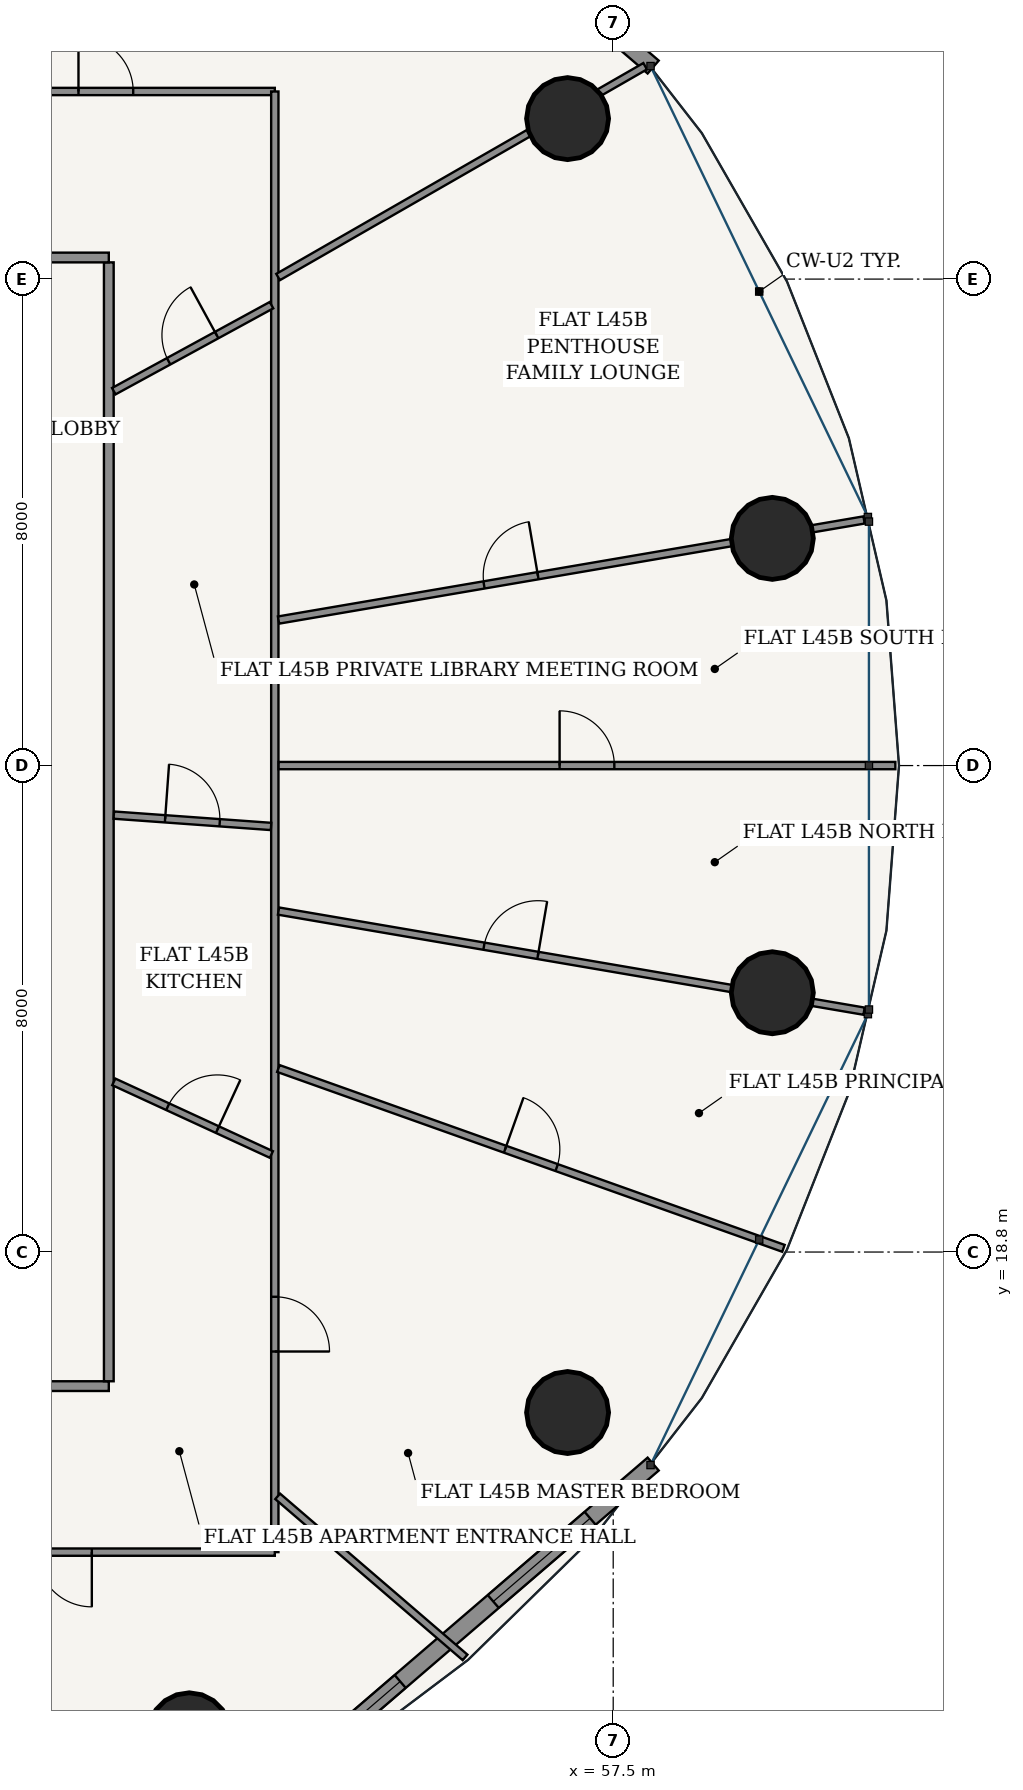
"""IFC4 building model, lengths in metres.
Left out: names, types, materials, properties, quantities, classifications, styles, units other than length and angle.
Written with IfcOpenShell. Run it as: python <this file> out.ifc"""

import sys

from ifc_helpers import new_model, si_unit, direction, frame, frame_2d, origin, origin_2d, place, context, subcontext, project, spatial, rectangle, hollow_circle, extrude, source, transform, mapped, element, fill, save


model = new_model("IFC4")
c1 = context("Model", 3, precision=1e-05, world=origin(), true_north=direction((-0.2419218956, 0.970295726276)))
c2 = subcontext(c1, "Body", "Model", "MODEL_VIEW")
j1 = project(units=[si_unit("LENGTHUNIT", "METRE"), si_unit("PLANEANGLEUNIT", "RADIAN")], contexts=[c1])
p1 = place(None, origin())
s1 = spatial("IfcSite", under=j1, at=p1, CompositionType="ELEMENT")
p2 = place(p1, origin())
s2 = spatial("IfcBuilding", under=s1, at=p2, CompositionType="ELEMENT")
p3 = place(p2, frame((0.0, 0.0, 171.4)))
s3 = spatial("IfcBuildingStorey", under=s2, at=p3, CompositionType="ELEMENT", Elevation=171.4)
for number, where, z_axis, x_axis in (
    (1, (60.117, 30.536, 0.0), (0.0, 0.0, 1.0), (1.0, 0.0, 0.0)),
    (2, (56.75, 37.439, 0.0), (0.0, 0.0, 1.0), (1.0, 0.0, 0.0)),
    (3, (50.528, 10.877, 0.0), (0.0, 0.0, 1.0), (1.0, 0.0, 0.0)),
    (4, (56.75, 16.161, 0.0), (0.0, 0.0, 1.0), (1.0, 0.0, 0.0)),
    (5, (60.117, 23.064, 0.0), (0.0, 0.0, 1.0), (1.0, 0.0, 0.0)),
):
    element("IfcColumn", number, at=place(p3, frame(where, z_axis=z_axis, x_axis=x_axis)), inside=s3, PredefinedType="COLUMN", context=c2, shape_type="SweptSolid", body=[
        extrude(hollow_circle(Radius=0.675, WallThickness=0.042, at=origin_2d()), origin(), (0.0, 0.0, 1.0), 3.6),
    ])
p4 = place(p3, frame((58.157, 38.287, 0.0), z_axis=(0.0, 0.0, 1.0), x_axis=(-0.75843401647, 0.651749831348, 0.0)))
e6 = element("IfcWall", 6, at=p4, inside=s3, PredefinedType="SOLIDWALL", context=c2, shape_type="SweptSolid", body=[
    extrude(rectangle(XDim=8.952, YDim=0.28, at=frame_2d((4.476, 0.0))), origin(), (0.0, 0.0, 1.0), 3.33),
])
p5 = place(p4, frame((1.367, 0.0, 0.85)))
e7 = element("IfcOpeningElement", 7, at=p5, cuts=e6, PredefinedType="OPENING", context=c2, shape_type="SweptSolid", body=[
    extrude(rectangle(XDim=2.1, YDim=1.95, at=frame_2d((1.05, 0.975))), frame((0.0, 0.15, 0.0), z_axis=(0.0, -1.0, 0.0), x_axis=(1.0, 0.0, 0.0)), (0.0, 0.0, 1.0), 0.3),
])
p6 = place(p4, frame((5.485, 0.0, 0.85)))
e8 = element("IfcOpeningElement", 8, at=p6, cuts=e6, PredefinedType="OPENING", context=c2, shape_type="SweptSolid", body=[
    extrude(rectangle(XDim=2.1, YDim=1.95, at=frame_2d((1.05, 0.975))), frame((0.0, 0.15, 0.0), z_axis=(0.0, -1.0, 0.0), x_axis=(1.0, 0.0, 0.0)), (0.0, 0.0, 1.0), 0.3),
])
p7 = place(p3, frame((51.367, 9.478, 0.0), z_axis=(0.0, 0.0, 1.0), x_axis=(0.75843401647, 0.651749831348, 0.0)))
e9 = element("IfcWall", 9, at=p7, inside=s3, PredefinedType="SOLIDWALL", context=c2, shape_type="SweptSolid", body=[
    extrude(rectangle(XDim=8.952, YDim=0.28, at=frame_2d((4.476, 0.0))), origin(), (0.0, 0.0, 1.0), 3.33),
])
p8 = place(p7, frame((1.367, 0.0, 0.85)))
e10 = element("IfcOpeningElement", 10, at=p8, cuts=e9, PredefinedType="OPENING", context=c2, shape_type="SweptSolid", body=[
    extrude(rectangle(XDim=2.1, YDim=1.95, at=frame_2d((1.05, 0.975))), frame((0.0, 0.15, 0.0), z_axis=(0.0, -1.0, 0.0), x_axis=(1.0, 0.0, 0.0)), (0.0, 0.0, 1.0), 0.3),
])
p9 = place(p7, frame((5.485, 0.0, 0.85)))
e11 = element("IfcOpeningElement", 11, at=p9, cuts=e9, PredefinedType="OPENING", context=c2, shape_type="SweptSolid", body=[
    extrude(rectangle(XDim=2.1, YDim=1.95, at=frame_2d((1.05, 0.975))), frame((0.0, 0.15, 0.0), z_axis=(0.0, -1.0, 0.0), x_axis=(1.0, 0.0, 0.0)), (0.0, 0.0, 1.0), 0.3),
])
p10 = place(p3, frame((34.32, 16.595, 0.0), z_axis=(0.0, 0.0, 1.0), x_axis=(1.0, 0.0, 0.0)))
e12 = element("IfcWall", 12, at=p10, inside=s3, PredefinedType="PARTITIONING", context=c2, shape_type="SweptSolid", body=[
    extrude(rectangle(XDim=14.885, YDim=0.16, at=frame_2d((7.442, 0.0))), origin(), (0.0, 0.0, 1.0), 2.776),
])
p11 = place(p10, frame((11.59, 0.0, 0.0)))
e13 = element("IfcOpeningElement", 13, at=p11, cuts=e12, PredefinedType="OPENING", context=c2, shape_type="SweptSolid", body=[
    extrude(rectangle(XDim=0.98, YDim=2.2, at=frame_2d((0.49, 1.1))), frame((0.0, 0.09, 0.0), z_axis=(0.0, -1.0, 0.0), x_axis=(1.0, 0.0, 0.0)), (0.0, 0.0, 1.0), 0.18),
])
p12 = place(p3, frame((49.205, 16.675, 0.0), z_axis=(0.0, 0.0, 1.0), x_axis=(0.0, 1.0, 0.0)))
e14 = element("IfcWall", 14, at=p12, inside=s3, PredefinedType="PARTITIONING", context=c2, shape_type="SweptSolid", body=[
    extrude(rectangle(XDim=18.4, YDim=0.16, at=frame_2d((9.2, 0.0))), origin(), (0.0, 0.0, 1.0), 2.776),
])
p13 = place(p3, frame((47.275, 35.155, 0.0), z_axis=(0.0, 0.0, 1.0), x_axis=(1.0, 0.0, 0.0)))
e15 = element("IfcWall", 15, at=p13, inside=s3, PredefinedType="PARTITIONING", context=c2, shape_type="SweptSolid", body=[
    extrude(rectangle(XDim=1.93, YDim=0.16, at=frame_2d((0.965, 0.0))), origin(), (0.0, 0.0, 1.0), 2.776),
])
p14 = place(p3, frame((44.465, 37.885, 0.0), z_axis=(0.0, 0.0, 1.0), x_axis=(1.0, 0.0, 0.0)))
e16 = element("IfcWall", 16, at=p14, inside=s3, PredefinedType="PARTITIONING", context=c2, shape_type="SweptSolid", body=[
    extrude(rectangle(XDim=7.47, YDim=0.12, at=frame_2d((3.735, 0.0))), origin(), (0.0, 0.0, 1.0), 2.776),
])
p15 = place(p14, frame((4.241, 0.0, 0.0)))
e17 = element("IfcOpeningElement", 17, at=p15, cuts=e16, PredefinedType="OPENING", context=c2, shape_type="SweptSolid", body=[
    extrude(rectangle(XDim=0.9, YDim=2.15, at=frame_2d((0.45, 1.075))), frame((0.0, 0.07, 0.0), z_axis=(0.0, -1.0, 0.0), x_axis=(1.0, 0.0, 0.0)), (0.0, 0.0, 1.0), 0.14),
])
p16 = place(p3, frame((51.935, 37.885, 0.0), z_axis=(0.0, 0.0, 1.0), x_axis=(0.0, -1.0, 0.0)))
e18 = element("IfcWall", 18, at=p16, inside=s3, PredefinedType="PARTITIONING", context=c2, shape_type="SweptSolid", body=[
    extrude(rectangle(XDim=24.02, YDim=0.12, at=frame_2d((12.01, 0.0))), origin(), (0.0, 0.0, 1.0), 2.776),
])
p17 = place(p16, frame((19.821, 0.0, 0.0)))
e19 = element("IfcOpeningElement", 19, at=p17, cuts=e18, PredefinedType="OPENING", context=c2, shape_type="SweptSolid", body=[
    extrude(rectangle(XDim=0.9, YDim=2.15, at=frame_2d((0.45, 1.075))), frame((0.0, 0.07, 0.0), z_axis=(0.0, -1.0, 0.0), x_axis=(1.0, 0.0, 0.0)), (0.0, 0.0, 1.0), 0.14),
])
p18 = place(p3, frame((51.935, 13.865, 0.0), z_axis=(0.0, 0.0, 1.0), x_axis=(-1.0, 0.0, 0.0)))
e20 = element("IfcWall", 20, at=p18, inside=s3, PredefinedType="PARTITIONING", context=c2, shape_type="SweptSolid", body=[
    extrude(rectangle(XDim=13.833, YDim=0.12, at=frame_2d((6.917, 0.0))), origin(), (0.0, 0.0, 1.0), 2.776),
])
p19 = place(p18, frame((3.009, 0.0, 0.0)))
e21 = element("IfcOpeningElement", 21, at=p19, cuts=e20, PredefinedType="OPENING", context=c2, shape_type="SweptSolid", body=[
    extrude(rectangle(XDim=0.9, YDim=2.15, at=frame_2d((0.45, 1.075))), frame((0.0, 0.07, 0.0), z_axis=(0.0, -1.0, 0.0), x_axis=(1.0, 0.0, 0.0)), (0.0, 0.0, 1.0), 0.14),
])
p20 = place(p3, frame((51.982, 14.782, 0.0), z_axis=(0.0, 0.0, 1.0), x_axis=(0.758356837469, -0.651839632935, 0.0)))
e22 = element("IfcWall", 22, at=p20, inside=s3, PredefinedType="PARTITIONING", context=c2, shape_type="SweptSolid", body=[
    extrude(rectangle(XDim=4.064, YDim=0.12, at=frame_2d((2.032, 0.0))), origin(), (0.0, 0.0, 1.0), 2.846),
])
p21 = place(p3, frame((51.993, 21.818, 0.0), z_axis=(0.0, 0.0, 1.0), x_axis=(0.942077868165, -0.335394231187, 0.0)))
e23 = element("IfcWall", 23, at=p21, inside=s3, PredefinedType="PARTITIONING", context=c2, shape_type="SweptSolid", body=[
    extrude(rectangle(XDim=8.817, YDim=0.12, at=frame_2d((4.408, 0.0))), origin(), (0.0, 0.0, 1.0), 2.846),
])
p22 = place(p21, frame((3.958, 0.0, 0.0)))
e24 = element("IfcOpeningElement", 24, at=p22, cuts=e23, PredefinedType="OPENING", context=c2, shape_type="SweptSolid", body=[
    extrude(rectangle(XDim=0.9, YDim=2.15, at=frame_2d((0.45, 1.075))), frame((0.0, 0.07, 0.0), z_axis=(0.0, -1.0, 0.0), x_axis=(1.0, 0.0, 0.0)), (0.0, 0.0, 1.0), 0.14),
])
p23 = place(p3, frame((51.996, 24.407, 0.0), z_axis=(0.0, 0.0, 1.0), x_axis=(0.985698378271, -0.168519159369, 0.0)))
e25 = element("IfcWall", 25, at=p23, inside=s3, PredefinedType="PARTITIONING", context=c2, shape_type="SweptSolid", body=[
    extrude(rectangle(XDim=9.769, YDim=0.12, at=frame_2d((4.884, 0.0))), origin(), (0.0, 0.0, 1.0), 2.776),
])
p24 = place(p23, frame((3.428, 0.0, 0.0)))
e26 = element("IfcOpeningElement", 26, at=p24, cuts=e25, PredefinedType="OPENING", context=c2, shape_type="SweptSolid", body=[
    extrude(rectangle(XDim=0.9, YDim=2.15, at=frame_2d((0.45, 1.075))), frame((0.0, 0.07, 0.0), z_axis=(0.0, -1.0, 0.0), x_axis=(1.0, 0.0, 0.0)), (0.0, 0.0, 1.0), 0.14),
])
p25 = place(p3, frame((51.997, 26.8, 0.0), z_axis=(0.0, 0.0, 1.0), x_axis=(1.0, 0.0, 0.0)))
e27 = element("IfcWall", 27, at=p25, inside=s3, PredefinedType="PARTITIONING", context=c2, shape_type="SweptSolid", body=[
    extrude(rectangle(XDim=10.143, YDim=0.12, at=frame_2d((5.071, 0.0))), origin(), (0.0, 0.0, 1.0), 2.846),
])
p26 = place(p25, frame((4.622, 0.0, 0.0)))
e28 = element("IfcOpeningElement", 28, at=p26, cuts=e27, PredefinedType="OPENING", context=c2, shape_type="SweptSolid", body=[
    extrude(rectangle(XDim=0.9, YDim=2.15, at=frame_2d((0.45, 1.075))), frame((0.0, 0.07, 0.0), z_axis=(0.0, -1.0, 0.0), x_axis=(1.0, 0.0, 0.0)), (0.0, 0.0, 1.0), 0.14),
])
p27 = place(p3, frame((51.996, 29.193, 0.0), z_axis=(0.0, 0.0, 1.0), x_axis=(0.985698378271, 0.168519159369, 0.0)))
e29 = element("IfcWall", 29, at=p27, inside=s3, PredefinedType="PARTITIONING", context=c2, shape_type="SweptSolid", body=[
    extrude(rectangle(XDim=9.769, YDim=0.12, at=frame_2d((4.884, 0.0))), origin(), (0.0, 0.0, 1.0), 2.776),
])
p28 = place(p27, frame((3.428, 0.0, 0.0)))
e30 = element("IfcOpeningElement", 30, at=p28, cuts=e29, PredefinedType="OPENING", context=c2, shape_type="SweptSolid", body=[
    extrude(rectangle(XDim=0.9, YDim=2.15, at=frame_2d((0.45, 1.075))), frame((0.0, 0.07, 0.0), z_axis=(0.0, -1.0, 0.0), x_axis=(1.0, 0.0, 0.0)), (0.0, 0.0, 1.0), 0.14),
])
p29 = place(p3, frame((51.989, 34.834, 0.0), z_axis=(0.0, 0.0, 1.0), x_axis=(0.86717064002, 0.498011125466, 0.0)))
e31 = element("IfcWall", 31, at=p29, inside=s3, PredefinedType="PARTITIONING", context=c2, shape_type="SweptSolid", body=[
    extrude(rectangle(XDim=6.961, YDim=0.12, at=frame_2d((3.48, 0.0))), origin(), (0.0, 0.0, 1.0), 2.776),
])
p30 = place(p3, frame((46.656, 37.934, 0.0), z_axis=(0.0, 0.0, 1.0), x_axis=(0.613758289074, 0.789493991487, 0.0)))
e32 = element("IfcWall", 32, at=p30, inside=s3, PredefinedType="PARTITIONING", context=c2, shape_type="SweptSolid", body=[
    extrude(rectangle(XDim=7.695, YDim=0.12, at=frame_2d((3.848, 0.0))), origin(), (0.0, 0.0, 1.0), 2.776),
])
p31 = place(p30, frame((2.399, 0.0, 0.0)))
e33 = element("IfcOpeningElement", 33, at=p31, cuts=e32, PredefinedType="OPENING", context=c2, shape_type="SweptSolid", body=[
    extrude(rectangle(XDim=0.9, YDim=2.15, at=frame_2d((0.45, 1.075))), frame((0.0, 0.07, 0.0), z_axis=(0.0, -1.0, 0.0), x_axis=(1.0, 0.0, 0.0)), (0.0, 0.0, 1.0), 0.14),
])
p32 = place(p3, frame((49.287, 21.598, 0.0), z_axis=(0.0, 0.0, 1.0), x_axis=(0.908177096136, -0.418586146514, 0.0)))
e34 = element("IfcWall", 34, at=p32, inside=s3, PredefinedType="PARTITIONING", context=c2, shape_type="SweptSolid", body=[
    extrude(rectangle(XDim=2.854, YDim=0.12, at=frame_2d((1.427, 0.0))), origin(), (0.0, 0.0, 1.0), 3.33),
])
p33 = place(p32, frame((0.977, 0.0, 0.0)))
e35 = element("IfcOpeningElement", 35, at=p33, cuts=e34, PredefinedType="OPENING", context=c2, shape_type="SweptSolid", body=[
    extrude(rectangle(XDim=0.9, YDim=2.15, at=frame_2d((0.45, 1.075))), frame((0.0, 0.07, 0.0), z_axis=(0.0, -1.0, 0.0), x_axis=(1.0, 0.0, 0.0)), (0.0, 0.0, 1.0), 0.14),
])
p34 = place(p3, frame((49.287, 25.985, 0.0), z_axis=(0.0, 0.0, 1.0), x_axis=(0.997408744903, -0.07194300237, 0.0)))
e36 = element("IfcWall", 36, at=p34, inside=s3, PredefinedType="PARTITIONING", context=c2, shape_type="SweptSolid", body=[
    extrude(rectangle(XDim=2.593, YDim=0.12, at=frame_2d((1.296, 0.0))), origin(), (0.0, 0.0, 1.0), 3.33),
])
p35 = place(p34, frame((0.846, 0.0, 0.0)))
e37 = element("IfcOpeningElement", 37, at=p35, cuts=e36, PredefinedType="OPENING", context=c2, shape_type="SweptSolid", body=[
    extrude(rectangle(XDim=0.9, YDim=2.15, at=frame_2d((0.45, 1.075))), frame((0.0, 0.07, 0.0), z_axis=(0.0, -1.0, 0.0), x_axis=(1.0, 0.0, 0.0)), (0.0, 0.0, 1.0), 0.14),
])
p36 = place(p3, frame((49.287, 32.957, 0.0), z_axis=(0.0, 0.0, 1.0), x_axis=(0.877892414948, 0.47885792024, 0.0)))
e38 = element("IfcWall", 38, at=p36, inside=s3, PredefinedType="PARTITIONING", context=c2, shape_type="SweptSolid", body=[
    extrude(rectangle(XDim=2.955, YDim=0.12, at=frame_2d((1.477, 0.0))), origin(), (0.0, 0.0, 1.0), 3.33),
])
p37 = place(p36, frame((1.027, 0.0, 0.0)))
e39 = element("IfcOpeningElement", 39, at=p37, cuts=e38, PredefinedType="OPENING", context=c2, shape_type="SweptSolid", body=[
    extrude(rectangle(XDim=0.9, YDim=2.15, at=frame_2d((0.45, 1.075))), frame((0.0, 0.07, 0.0), z_axis=(0.0, -1.0, 0.0), x_axis=(1.0, 0.0, 0.0)), (0.0, 0.0, 1.0), 0.14),
])
m1 = source(origin(), c2, "Body", "SweptSolid", [
    extrude(rectangle(XDim=2.1, YDim=1.95, at=frame_2d((1.05, 0.975))), frame((0.0, 0.03, 0.0), z_axis=(0.0, -1.0, 0.0), x_axis=(1.0, 0.0, 0.0)), (0.0, 0.0, 1.0), 0.06),
])
p38 = place(p8, origin())
e40 = element("IfcWindow", 40, at=p38, inside=s3, PartitioningType="SINGLE_PANEL", PredefinedType="WINDOW", context=c2, shape_type="MappedRepresentation", body=[
    mapped(m1, transform((0.0, 0.0, 0.0), scale=1.0)),
])
fill(e10, e40)
p39 = place(p9, origin())
e41 = element("IfcWindow", 41, at=p39, inside=s3, PartitioningType="SINGLE_PANEL", PredefinedType="WINDOW", context=c2, shape_type="MappedRepresentation", body=[
    mapped(m1, transform((0.0, 0.0, 0.0), scale=1.0)),
])
fill(e11, e41)
m2 = source(origin(), c2, "Body", "SweptSolid", [
    extrude(rectangle(XDim=0.9, YDim=2.15, at=frame_2d((0.45, 1.075))), frame((0.0, 0.025, 0.0), z_axis=(0.0, -1.0, 0.0), x_axis=(1.0, 0.0, 0.0)), (0.0, 0.0, 1.0), 0.05),
])
p40 = place(p19, origin())
e42 = element("IfcDoor", 42, at=p40, inside=s3, OperationType="SINGLE_SWING_LEFT", PredefinedType="DOOR", context=c2, shape_type="MappedRepresentation", body=[
    mapped(m2, transform((0.0, 0.0, 0.0), scale=1.0)),
])
fill(e21, e42)
p41 = place(p33, origin())
e43 = element("IfcDoor", 43, at=p41, inside=s3, OperationType="SINGLE_SWING_RIGHT", PredefinedType="DOOR", context=c2, shape_type="MappedRepresentation", body=[
    mapped(m2, transform((0.0, 0.0, 0.0), scale=1.0)),
])
fill(e35, e43)
p42 = place(p35, origin())
e44 = element("IfcDoor", 44, at=p42, inside=s3, OperationType="SINGLE_SWING_LEFT", PredefinedType="DOOR", context=c2, shape_type="MappedRepresentation", body=[
    mapped(m2, transform((0.0, 0.0, 0.0), scale=1.0)),
])
fill(e37, e44)
p43 = place(p37, origin())
e45 = element("IfcDoor", 45, at=p43, inside=s3, OperationType="SINGLE_SWING_RIGHT", PredefinedType="DOOR", context=c2, shape_type="MappedRepresentation", body=[
    mapped(m2, transform((0.0, 0.0, 0.0), scale=1.0)),
])
fill(e39, e45)
p44 = place(p17, origin())
e46 = element("IfcDoor", 46, at=p44, inside=s3, OperationType="SINGLE_SWING_RIGHT", PredefinedType="DOOR", context=c2, shape_type="MappedRepresentation", body=[
    mapped(m2, transform((0.0, 0.0, 0.0), scale=1.0)),
])
fill(e19, e46)
p45 = place(p22, origin())
e47 = element("IfcDoor", 47, at=p45, inside=s3, OperationType="SINGLE_SWING_LEFT", PredefinedType="DOOR", context=c2, shape_type="MappedRepresentation", body=[
    mapped(m2, transform((0.0, 0.0, 0.0), scale=1.0)),
])
fill(e24, e47)
p46 = place(p24, origin())
e48 = element("IfcDoor", 48, at=p46, inside=s3, OperationType="SINGLE_SWING_RIGHT", PredefinedType="DOOR", context=c2, shape_type="MappedRepresentation", body=[
    mapped(m2, transform((0.0, 0.0, 0.0), scale=1.0)),
])
fill(e26, e48)
p47 = place(p26, origin())
e49 = element("IfcDoor", 49, at=p47, inside=s3, OperationType="SINGLE_SWING_LEFT", PredefinedType="DOOR", context=c2, shape_type="MappedRepresentation", body=[
    mapped(m2, transform((0.0, 0.0, 0.0), scale=1.0)),
])
fill(e28, e49)
p48 = place(p28, origin())
e50 = element("IfcDoor", 50, at=p48, inside=s3, OperationType="SINGLE_SWING_RIGHT", PredefinedType="DOOR", context=c2, shape_type="MappedRepresentation", body=[
    mapped(m2, transform((0.0, 0.0, 0.0), scale=1.0)),
])
fill(e30, e50)
p49 = place(p15, origin())
e51 = element("IfcDoor", 51, at=p49, inside=s3, OperationType="SINGLE_SWING_LEFT", PredefinedType="DOOR", context=c2, shape_type="MappedRepresentation", body=[
    mapped(m2, transform((0.0, 0.0, 0.0), scale=1.0)),
])
fill(e17, e51)
save(model, sys.argv[1])
